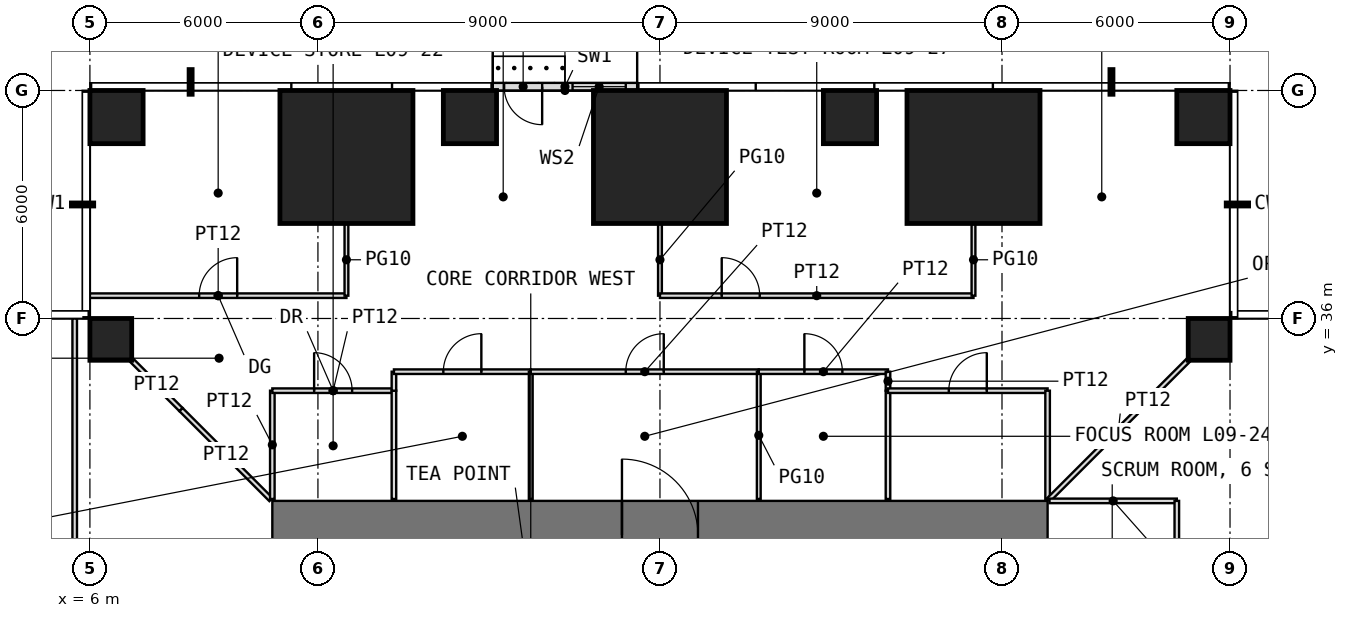
"""IFC4 building model, lengths in metres.
Left out: names, types, materials, properties, quantities, classifications, styles, units other than length and angle.
Written with IfcOpenShell. Run it as: python <this file> out.ifc"""

import sys

from ifc_helpers import new_model, si_unit, direction, frame, frame_2d, origin, origin_2d, place, context, subcontext, project, spatial, rectangle, extrude, element, fill, save


model = new_model("IFC4")
c1 = context("Model", 3, precision=1e-05, world=origin(), true_north=direction((0.0, 1.0)))
c2 = subcontext(c1, "Body", "Model", "MODEL_VIEW")
j1 = project(units=[si_unit("LENGTHUNIT", "METRE"), si_unit("PLANEANGLEUNIT", "RADIAN")], contexts=[c1])
p1 = place(None, origin())
s1 = spatial("IfcSite", under=j1, at=p1, CompositionType="ELEMENT")
p2 = place(p1, origin())
s2 = spatial("IfcBuilding", under=s1, at=p2, CompositionType="ELEMENT")
p3 = place(p2, frame((0.0, 0.0, 42.5)))
s3 = spatial("IfcBuildingStorey", under=s2, at=p3, CompositionType="ELEMENT", Elevation=42.5)
for number, where, z_axis, x_axis in (
    (1, (6.55, 35.45, 0.0), (0.0, 0.0, 1.0), (1.0, 0.0, 0.0)),
    (2, (35.45, 35.45, 0.0), (0.0, 0.0, 1.0), (1.0, 0.0, 0.0)),
):
    element("IfcColumn", number, at=place(p3, frame(where, z_axis=z_axis, x_axis=x_axis)), inside=s3, PredefinedType="COLUMN", context=c2, shape_type="SweptSolid", body=[
        extrude(rectangle(XDim=1.1, YDim=1.1, at=origin_2d()), origin(), (0.0, 0.0, 1.0), 4.0),
    ])
p4 = place(p3, frame((6.7, 41.3, 0.0), z_axis=(0.0, 0.0, 1.0), x_axis=(1.0, 0.0, 0.0)))
e3 = element("IfcColumn", 3, at=p4, inside=s3, PredefinedType="COLUMN", context=c2, shape_type="SweptSolid", body=[
    extrude(rectangle(XDim=1.4, YDim=1.4, at=origin_2d()), origin(), (0.0, 0.0, 1.0), 4.0),
])
p5 = place(p3, frame((12.75, 40.25, 0.0), z_axis=(0.0, 0.0, 1.0), x_axis=(1.0, 0.0, 0.0)))
e4 = element("IfcColumn", 4, at=p5, inside=s3, PredefinedType="COLUMN", context=c2, shape_type="SweptSolid", body=[
    extrude(rectangle(XDim=3.5, YDim=3.5, at=origin_2d()), origin(), (0.0, 0.0, 1.0), 4.0),
])
p6 = place(p3, frame((16.0, 41.3, 0.0), z_axis=(0.0, 0.0, 1.0), x_axis=(1.0, 0.0, 0.0)))
e5 = element("IfcColumn", 5, at=p6, inside=s3, PredefinedType="COLUMN", context=c2, shape_type="SweptSolid", body=[
    extrude(rectangle(XDim=1.4, YDim=1.4, at=origin_2d()), origin(), (0.0, 0.0, 1.0), 4.0),
])
p7 = place(p3, frame((21.0, 40.25, 0.0), z_axis=(0.0, 0.0, 1.0), x_axis=(1.0, 0.0, 0.0)))
e6 = element("IfcColumn", 6, at=p7, inside=s3, PredefinedType="COLUMN", context=c2, shape_type="SweptSolid", body=[
    extrude(rectangle(XDim=3.5, YDim=3.5, at=origin_2d()), origin(), (0.0, 0.0, 1.0), 4.0),
])
p8 = place(p3, frame((26.0, 41.3, 0.0), z_axis=(0.0, 0.0, 1.0), x_axis=(1.0, 0.0, 0.0)))
e7 = element("IfcColumn", 7, at=p8, inside=s3, PredefinedType="COLUMN", context=c2, shape_type="SweptSolid", body=[
    extrude(rectangle(XDim=1.4, YDim=1.4, at=origin_2d()), origin(), (0.0, 0.0, 1.0), 4.0),
])
p9 = place(p3, frame((29.25, 40.25, 0.0), z_axis=(0.0, 0.0, 1.0), x_axis=(1.0, 0.0, 0.0)))
e8 = element("IfcColumn", 8, at=p9, inside=s3, PredefinedType="COLUMN", context=c2, shape_type="SweptSolid", body=[
    extrude(rectangle(XDim=3.5, YDim=3.5, at=origin_2d()), origin(), (0.0, 0.0, 1.0), 4.0),
])
p10 = place(p3, frame((35.3, 41.3, 0.0), z_axis=(0.0, 0.0, 1.0), x_axis=(1.0, 0.0, 0.0)))
e9 = element("IfcColumn", 9, at=p10, inside=s3, PredefinedType="COLUMN", context=c2, shape_type="SweptSolid", body=[
    extrude(rectangle(XDim=1.4, YDim=1.4, at=origin_2d()), origin(), (0.0, 0.0, 1.0), 4.0),
])
p11 = place(p3, frame((20.4, 42.1, 0.0), z_axis=(0.0, 0.0, 1.0), x_axis=(-1.0, 0.0, 0.0)))
e10 = element("IfcWall", 10, at=p11, inside=s3, PredefinedType="USERDEFINED", context=c2, shape_type="SweptSolid", body=[
    extrude(rectangle(XDim=3.8, YDim=0.2, at=frame_2d((1.9, 0.0))), origin(), (0.0, 0.0, 1.0), 3.75),
])
p12 = place(p11, frame((2.5, 0.0, 0.0)))
e11 = element("IfcOpeningElement", 11, at=p12, cuts=e10, PredefinedType="OPENING", context=c2, shape_type="SweptSolid", body=[
    extrude(rectangle(XDim=1.0, YDim=2.4, at=frame_2d((0.5, 1.2))), frame((0.0, 0.11, 0.0), z_axis=(0.0, -1.0, 0.0), x_axis=(1.0, 0.0, 0.0)), (0.0, 0.0, 1.0), 0.22),
])
p13 = place(p11, frame((0.3, 0.0, 0.3)))
e12 = element("IfcOpeningElement", 12, at=p13, cuts=e10, PredefinedType="OPENING", context=c2, shape_type="SweptSolid", body=[
    extrude(rectangle(XDim=1.4, YDim=2.7, at=frame_2d((0.7, 1.35))), frame((0.0, 0.11, 0.0), z_axis=(0.0, -1.0, 0.0), x_axis=(1.0, 0.0, 0.0)), (0.0, 0.0, 1.0), 0.22),
])
p14 = place(p3, frame((10.8, 30.3, -0.05), z_axis=(0.0, 0.0, 1.0), x_axis=(1.0, 0.0, 0.0)))
e13 = element("IfcWall", 13, at=p14, inside=s3, PredefinedType="SHEAR", context=c2, shape_type="SweptSolid", body=[
    extrude(rectangle(XDim=20.4, YDim=1.8, at=frame_2d((10.2, 0.0))), origin(), (0.0, 0.0, 1.0), 4.0),
])
p15 = place(p14, frame((9.2, 0.0, 0.05)))
e14 = element("IfcOpeningElement", 14, at=p15, cuts=e13, PredefinedType="OPENING", context=c2, shape_type="SweptSolid", body=[
    extrude(rectangle(XDim=2.0, YDim=2.2, at=frame_2d((1.0, 1.1))), frame((0.0, 0.91, 0.0), z_axis=(0.0, -1.0, 0.0), x_axis=(1.0, 0.0, 0.0)), (0.0, 0.0, 1.0), 1.82),
])
p16 = place(p3, frame((5.6, 6.0, 0.0), z_axis=(0.0, 0.0, 1.0), x_axis=(0.0, 1.0, 0.0)))
e15 = element("IfcWall", 15, at=p16, inside=s3, PredefinedType="PARTITIONING", context=c2, shape_type="SweptSolid", body=[
    extrude(rectangle(XDim=30.0, YDim=0.12, at=frame_2d((15.0, 0.0))), origin(), (0.0, 0.0, 1.0), 3.75),
])
p17 = place(p16, frame((14.5, 0.0, 0.0)))
e16 = element("IfcOpeningElement", 16, at=p17, cuts=e15, PredefinedType="OPENING", context=c2, shape_type="SweptSolid", body=[
    extrude(rectangle(XDim=1.0, YDim=2.4, at=frame_2d((0.5, 1.2))), frame((0.0, 0.07, 0.0), z_axis=(0.0, -1.0, 0.0), x_axis=(1.0, 0.0, 0.0)), (0.0, 0.0, 1.0), 0.14),
])
p18 = place(p3, frame((6.0, 36.6, 0.0), z_axis=(0.0, 0.0, 1.0), x_axis=(1.0, 0.0, 0.0)))
e17 = element("IfcWall", 17, at=p18, inside=s3, PredefinedType="PARTITIONING", context=c2, shape_type="SweptSolid", body=[
    extrude(rectangle(XDim=6.75, YDim=0.12, at=frame_2d((3.375, 0.0))), origin(), (0.0, 0.0, 1.0), 3.75),
])
p19 = place(p18, frame((2.875, 0.0, 0.0)))
e18 = element("IfcOpeningElement", 18, at=p19, cuts=e17, PredefinedType="OPENING", context=c2, shape_type="SweptSolid", body=[
    extrude(rectangle(XDim=1.0, YDim=2.4, at=frame_2d((0.5, 1.2))), frame((0.0, 0.07, 0.0), z_axis=(0.0, -1.0, 0.0), x_axis=(1.0, 0.0, 0.0)), (0.0, 0.0, 1.0), 0.14),
])
p20 = place(p3, frame((7.11, 34.89, 0.0), z_axis=(0.0, 0.0, 1.0), x_axis=(0.707106781187, -0.707106781187, 0.0)))
e19 = element("IfcWall", 19, at=p20, inside=s3, PredefinedType="PARTITIONING", context=c2, shape_type="SweptSolid", body=[
    extrude(rectangle(XDim=1.822, YDim=0.12, at=frame_2d((0.911, 0.0))), origin(), (0.0, 0.0, 1.0), 3.75),
])
p21 = place(p3, frame((8.398, 33.602, 0.0), z_axis=(0.0, 0.0, 1.0), x_axis=(0.707106781187, -0.707106781187, 0.0)))
e20 = element("IfcWall", 20, at=p21, inside=s3, PredefinedType="PARTITIONING", context=c2, shape_type="SweptSolid", body=[
    extrude(rectangle(XDim=3.346, YDim=0.12, at=frame_2d((1.673, 0.0))), origin(), (0.0, 0.0, 1.0), 3.75),
])
p22 = place(p3, frame((10.8, 31.25, 0.0), z_axis=(0.0, 0.0, 1.0), x_axis=(0.0, 1.0, 0.0)))
e21 = element("IfcWall", 21, at=p22, inside=s3, PredefinedType="PARTITIONING", context=c2, shape_type="SweptSolid", body=[
    extrude(rectangle(XDim=2.85, YDim=0.12, at=frame_2d((1.425, 0.0))), origin(), (0.0, 0.0, 1.0), 3.75),
])
p23 = place(p3, frame((10.8, 34.1, 0.0), z_axis=(0.0, 0.0, 1.0), x_axis=(1.0, 0.0, 0.0)))
e22 = element("IfcWall", 22, at=p23, inside=s3, PredefinedType="PARTITIONING", context=c2, shape_type="SweptSolid", body=[
    extrude(rectangle(XDim=3.2, YDim=0.12, at=frame_2d((1.6, 0.0))), origin(), (0.0, 0.0, 1.0), 3.75),
])
p24 = place(p23, frame((1.1, 0.0, 0.0)))
e23 = element("IfcOpeningElement", 23, at=p24, cuts=e22, PredefinedType="OPENING", context=c2, shape_type="SweptSolid", body=[
    extrude(rectangle(XDim=1.0, YDim=2.2, at=frame_2d((0.5, 1.1))), frame((0.0, 0.07, 0.0), z_axis=(0.0, -1.0, 0.0), x_axis=(1.0, 0.0, 0.0)), (0.0, 0.0, 1.0), 0.14),
])
p25 = place(p3, frame((12.75, 36.6, 0.0), z_axis=(0.0, 0.0, 1.0), x_axis=(0.0, 1.0, 0.0)))
e24 = element("IfcWall", 24, at=p25, inside=s3, PredefinedType="PARTITIONING", context=c2, shape_type="SweptSolid", body=[
    extrude(rectangle(XDim=1.89, YDim=0.1, at=frame_2d((0.945, 0.0))), origin(), (0.0, 0.0, 1.0), 3.75),
])
p26 = place(p3, frame((14.0, 31.25, 0.0), z_axis=(0.0, 0.0, 1.0), x_axis=(0.0, 1.0, 0.0)))
e25 = element("IfcWall", 25, at=p26, inside=s3, PredefinedType="PARTITIONING", context=c2, shape_type="SweptSolid", body=[
    extrude(rectangle(XDim=2.85, YDim=0.12, at=frame_2d((1.425, 0.0))), origin(), (0.0, 0.0, 1.0), 3.75),
])
p27 = place(p3, frame((14.0, 34.1, 0.0), z_axis=(0.0, 0.0, 1.0), x_axis=(0.0, 1.0, 0.0)))
e26 = element("IfcWall", 26, at=p27, inside=s3, PredefinedType="PARTITIONING", context=c2, shape_type="SweptSolid", body=[
    extrude(rectangle(XDim=0.5, YDim=0.12, at=frame_2d((0.25, 0.0))), origin(), (0.0, 0.0, 1.0), 3.75),
])
p28 = place(p3, frame((14.0, 34.6, 0.0), z_axis=(0.0, 0.0, 1.0), x_axis=(1.0, 0.0, 0.0)))
e27 = element("IfcWall", 27, at=p28, inside=s3, PredefinedType="PARTITIONING", context=c2, shape_type="SweptSolid", body=[
    extrude(rectangle(XDim=3.6, YDim=0.12, at=frame_2d((1.8, 0.0))), origin(), (0.0, 0.0, 1.0), 3.75),
])
p29 = place(p28, frame((1.3, 0.0, 0.0)))
e28 = element("IfcOpeningElement", 28, at=p29, cuts=e27, PredefinedType="OPENING", context=c2, shape_type="SweptSolid", body=[
    extrude(rectangle(XDim=1.0, YDim=2.4, at=frame_2d((0.5, 1.2))), frame((0.0, 0.07, 0.0), z_axis=(0.0, -1.0, 0.0), x_axis=(1.0, 0.0, 0.0)), (0.0, 0.0, 1.0), 0.14),
])
p30 = place(p3, frame((17.6, 31.25, 0.0), z_axis=(0.0, 0.0, 1.0), x_axis=(0.0, 1.0, 0.0)))
e29 = element("IfcWall", 29, at=p30, inside=s3, PredefinedType="PARTITIONING", context=c2, shape_type="SweptSolid", body=[
    extrude(rectangle(XDim=3.35, YDim=0.1, at=frame_2d((1.675, 0.0))), origin(), (0.0, 0.0, 1.0), 3.75),
])
p31 = place(p3, frame((17.6, 34.6, 0.0), z_axis=(0.0, 0.0, 1.0), x_axis=(1.0, 0.0, 0.0)))
e30 = element("IfcWall", 30, at=p31, inside=s3, PredefinedType="PARTITIONING", context=c2, shape_type="SweptSolid", body=[
    extrude(rectangle(XDim=6.0, YDim=0.12, at=frame_2d((3.0, 0.0))), origin(), (0.0, 0.0, 1.0), 3.75),
])
p32 = place(p31, frame((2.5, 0.0, 0.0)))
e31 = element("IfcOpeningElement", 31, at=p32, cuts=e30, PredefinedType="OPENING", context=c2, shape_type="SweptSolid", body=[
    extrude(rectangle(XDim=1.0, YDim=2.4, at=frame_2d((0.5, 1.2))), frame((0.0, 0.07, 0.0), z_axis=(0.0, -1.0, 0.0), x_axis=(1.0, 0.0, 0.0)), (0.0, 0.0, 1.0), 0.14),
])
p33 = place(p3, frame((21.0, 36.6, 0.0), z_axis=(0.0, 0.0, 1.0), x_axis=(0.0, 1.0, 0.0)))
e32 = element("IfcWall", 32, at=p33, inside=s3, PredefinedType="PARTITIONING", context=c2, shape_type="SweptSolid", body=[
    extrude(rectangle(XDim=1.89, YDim=0.1, at=frame_2d((0.945, 0.0))), origin(), (0.0, 0.0, 1.0), 3.75),
])
p34 = place(p3, frame((21.0, 36.6, 0.0), z_axis=(0.0, 0.0, 1.0), x_axis=(1.0, 0.0, 0.0)))
e33 = element("IfcWall", 33, at=p34, inside=s3, PredefinedType="PARTITIONING", context=c2, shape_type="SweptSolid", body=[
    extrude(rectangle(XDim=8.25, YDim=0.12, at=frame_2d((4.125, 0.0))), origin(), (0.0, 0.0, 1.0), 3.75),
])
p35 = place(p34, frame((1.625, 0.0, 0.0)))
e34 = element("IfcOpeningElement", 34, at=p35, cuts=e33, PredefinedType="OPENING", context=c2, shape_type="SweptSolid", body=[
    extrude(rectangle(XDim=1.0, YDim=2.4, at=frame_2d((0.5, 1.2))), frame((0.0, 0.07, 0.0), z_axis=(0.0, -1.0, 0.0), x_axis=(1.0, 0.0, 0.0)), (0.0, 0.0, 1.0), 0.14),
])
p36 = place(p3, frame((23.6, 31.25, 0.0), z_axis=(0.0, 0.0, 1.0), x_axis=(0.0, 1.0, 0.0)))
e35 = element("IfcWall", 35, at=p36, inside=s3, PredefinedType="PARTITIONING", context=c2, shape_type="SweptSolid", body=[
    extrude(rectangle(XDim=3.35, YDim=0.1, at=frame_2d((1.675, 0.0))), origin(), (0.0, 0.0, 1.0), 3.75),
])
p37 = place(p3, frame((23.6, 34.6, 0.0), z_axis=(0.0, 0.0, 1.0), x_axis=(1.0, 0.0, 0.0)))
e36 = element("IfcWall", 36, at=p37, inside=s3, PredefinedType="PARTITIONING", context=c2, shape_type="SweptSolid", body=[
    extrude(rectangle(XDim=3.4, YDim=0.12, at=frame_2d((1.7, 0.0))), origin(), (0.0, 0.0, 1.0), 3.75),
])
p38 = place(p37, frame((1.2, 0.0, 0.0)))
e37 = element("IfcOpeningElement", 37, at=p38, cuts=e36, PredefinedType="OPENING", context=c2, shape_type="SweptSolid", body=[
    extrude(rectangle(XDim=1.0, YDim=2.4, at=frame_2d((0.5, 1.2))), frame((0.0, 0.07, 0.0), z_axis=(0.0, -1.0, 0.0), x_axis=(1.0, 0.0, 0.0)), (0.0, 0.0, 1.0), 0.14),
])
p39 = place(p3, frame((27.0, 31.25, 0.0), z_axis=(0.0, 0.0, 1.0), x_axis=(0.0, 1.0, 0.0)))
e38 = element("IfcWall", 38, at=p39, inside=s3, PredefinedType="PARTITIONING", context=c2, shape_type="SweptSolid", body=[
    extrude(rectangle(XDim=2.85, YDim=0.12, at=frame_2d((1.425, 0.0))), origin(), (0.0, 0.0, 1.0), 3.75),
])
p40 = place(p3, frame((27.0, 34.1, 0.0), z_axis=(0.0, 0.0, 1.0), x_axis=(0.0, 1.0, 0.0)))
e39 = element("IfcWall", 39, at=p40, inside=s3, PredefinedType="PARTITIONING", context=c2, shape_type="SweptSolid", body=[
    extrude(rectangle(XDim=0.5, YDim=0.12, at=frame_2d((0.25, 0.0))), origin(), (0.0, 0.0, 1.0), 3.75),
])
p41 = place(p3, frame((27.0, 34.1, 0.0), z_axis=(0.0, 0.0, 1.0), x_axis=(1.0, 0.0, 0.0)))
e40 = element("IfcWall", 40, at=p41, inside=s3, PredefinedType="PARTITIONING", context=c2, shape_type="SweptSolid", body=[
    extrude(rectangle(XDim=4.2, YDim=0.12, at=frame_2d((2.1, 0.0))), origin(), (0.0, 0.0, 1.0), 3.75),
])
p42 = place(p41, frame((1.6, 0.0, 0.0)))
e41 = element("IfcOpeningElement", 41, at=p42, cuts=e40, PredefinedType="OPENING", context=c2, shape_type="SweptSolid", body=[
    extrude(rectangle(XDim=1.0, YDim=2.2, at=frame_2d((0.5, 1.1))), frame((0.0, 0.07, 0.0), z_axis=(0.0, -1.0, 0.0), x_axis=(1.0, 0.0, 0.0)), (0.0, 0.0, 1.0), 0.14),
])
p43 = place(p3, frame((29.25, 36.6, 0.0), z_axis=(0.0, 0.0, 1.0), x_axis=(0.0, 1.0, 0.0)))
e42 = element("IfcWall", 42, at=p43, inside=s3, PredefinedType="PARTITIONING", context=c2, shape_type="SweptSolid", body=[
    extrude(rectangle(XDim=1.89, YDim=0.1, at=frame_2d((0.945, 0.0))), origin(), (0.0, 0.0, 1.0), 3.75),
])
p44 = place(p3, frame((31.2, 31.25, 0.0), z_axis=(0.0, 0.0, 1.0), x_axis=(0.0, 1.0, 0.0)))
e43 = element("IfcWall", 43, at=p44, inside=s3, PredefinedType="PARTITIONING", context=c2, shape_type="SweptSolid", body=[
    extrude(rectangle(XDim=2.85, YDim=0.12, at=frame_2d((1.425, 0.0))), origin(), (0.0, 0.0, 1.0), 3.75),
])
p45 = place(p3, frame((31.235, 31.235, 0.0), z_axis=(0.0, 0.0, 1.0), x_axis=(0.707106781187, 0.707106781187, 0.0)))
e44 = element("IfcWall", 44, at=p45, inside=s3, PredefinedType="PARTITIONING", context=c2, shape_type="SweptSolid", body=[
    extrude(rectangle(XDim=5.168, YDim=0.12, at=frame_2d((2.584, 0.0))), origin(), (0.0, 0.0, 1.0), 3.75),
])
p46 = place(p3, frame((31.25, 31.2, 0.0), z_axis=(0.0, 0.0, 1.0), x_axis=(1.0, 0.0, 0.0)))
e45 = element("IfcWall", 45, at=p46, inside=s3, PredefinedType="PARTITIONING", context=c2, shape_type="SweptSolid", body=[
    extrude(rectangle(XDim=3.35, YDim=0.12, at=frame_2d((1.675, 0.0))), origin(), (0.0, 0.0, 1.0), 3.75),
])
p47 = place(p3, frame((34.6, 25.4, 0.0), z_axis=(0.0, 0.0, 1.0), x_axis=(0.0, 1.0, 0.0)))
e46 = element("IfcWall", 46, at=p47, inside=s3, PredefinedType="PARTITIONING", context=c2, shape_type="SweptSolid", body=[
    extrude(rectangle(XDim=5.8, YDim=0.12, at=frame_2d((2.9, 0.0))), origin(), (0.0, 0.0, 1.0), 3.75),
])
p48 = place(p47, frame((2.4, 0.0, 0.0)))
e47 = element("IfcOpeningElement", 47, at=p48, cuts=e46, PredefinedType="OPENING", context=c2, shape_type="SweptSolid", body=[
    extrude(rectangle(XDim=1.0, YDim=2.4, at=frame_2d((0.5, 1.2))), frame((0.0, 0.07, 0.0), z_axis=(0.0, -1.0, 0.0), x_axis=(1.0, 0.0, 0.0)), (0.0, 0.0, 1.0), 0.14),
])
p49 = place(p12, origin())
e48 = element("IfcDoor", 48, at=p49, inside=s3, OperationType="SINGLE_SWING_LEFT", PredefinedType="DOOR", context=c2, shape_type="SweptSolid", body=[
    extrude(rectangle(XDim=1.0, YDim=2.4, at=frame_2d((0.5, 1.2))), frame((0.0, 0.025, 0.0), z_axis=(0.0, -1.0, 0.0), x_axis=(1.0, 0.0, 0.0)), (0.0, 0.0, 1.0), 0.05),
])
fill(e11, e48)
p50 = place(p13, origin())
e49 = element("IfcWindow", 49, at=p50, inside=s3, PartitioningType="SINGLE_PANEL", PredefinedType="WINDOW", context=c2, shape_type="SweptSolid", body=[
    extrude(rectangle(XDim=1.4, YDim=2.7, at=frame_2d((0.7, 1.35))), frame((0.0, 0.03, 0.0), z_axis=(0.0, -1.0, 0.0), x_axis=(1.0, 0.0, 0.0)), (0.0, 0.0, 1.0), 0.06),
])
fill(e12, e49)
p51 = place(p15, origin())
e50 = element("IfcDoor", 50, at=p51, inside=s3, OperationType="DOUBLE_DOOR_SINGLE_SWING", PredefinedType="DOOR", context=c2, shape_type="SweptSolid", body=[
    extrude(rectangle(XDim=2.0, YDim=2.2, at=frame_2d((1.0, 1.1))), frame((0.0, 0.025, 0.0), z_axis=(0.0, -1.0, 0.0), x_axis=(1.0, 0.0, 0.0)), (0.0, 0.0, 1.0), 0.05),
])
fill(e14, e50)
p52 = place(p24, origin())
e51 = element("IfcDoor", 51, at=p52, inside=s3, OperationType="SINGLE_SWING_LEFT", PredefinedType="DOOR", context=c2, shape_type="SweptSolid", body=[
    extrude(rectangle(XDim=1.0, YDim=2.2, at=frame_2d((0.5, 1.1))), frame((0.0, 0.025, 0.0), z_axis=(0.0, -1.0, 0.0), x_axis=(1.0, 0.0, 0.0)), (0.0, 0.0, 1.0), 0.05),
])
fill(e23, e51)
p53 = place(p29, origin())
e52 = element("IfcDoor", 52, at=p53, inside=s3, OperationType="SINGLE_SWING_RIGHT", PredefinedType="DOOR", context=c2, shape_type="SweptSolid", body=[
    extrude(rectangle(XDim=1.0, YDim=2.4, at=frame_2d((0.5, 1.2))), frame((0.0, 0.025, 0.0), z_axis=(0.0, -1.0, 0.0), x_axis=(1.0, 0.0, 0.0)), (0.0, 0.0, 1.0), 0.05),
])
fill(e28, e52)
p54 = place(p38, origin())
e53 = element("IfcDoor", 53, at=p54, inside=s3, OperationType="SINGLE_SWING_LEFT", PredefinedType="DOOR", context=c2, shape_type="SweptSolid", body=[
    extrude(rectangle(XDim=1.0, YDim=2.4, at=frame_2d((0.5, 1.2))), frame((0.0, 0.025, 0.0), z_axis=(0.0, -1.0, 0.0), x_axis=(1.0, 0.0, 0.0)), (0.0, 0.0, 1.0), 0.05),
])
fill(e37, e53)
p55 = place(p42, origin())
e54 = element("IfcDoor", 54, at=p55, inside=s3, OperationType="SINGLE_SWING_RIGHT", PredefinedType="DOOR", context=c2, shape_type="SweptSolid", body=[
    extrude(rectangle(XDim=1.0, YDim=2.2, at=frame_2d((0.5, 1.1))), frame((0.0, 0.025, 0.0), z_axis=(0.0, -1.0, 0.0), x_axis=(1.0, 0.0, 0.0)), (0.0, 0.0, 1.0), 0.05),
])
fill(e41, e54)
p56 = place(p19, origin())
e55 = element("IfcDoor", 55, at=p56, inside=s3, OperationType="SINGLE_SWING_RIGHT", PredefinedType="DOOR", context=c2, shape_type="SweptSolid", body=[
    extrude(rectangle(XDim=1.0, YDim=2.4, at=frame_2d((0.5, 1.2))), frame((0.0, 0.025, 0.0), z_axis=(0.0, -1.0, 0.0), x_axis=(1.0, 0.0, 0.0)), (0.0, 0.0, 1.0), 0.05),
])
fill(e18, e55)
p57 = place(p35, origin())
e56 = element("IfcDoor", 56, at=p57, inside=s3, OperationType="SINGLE_SWING_LEFT", PredefinedType="DOOR", context=c2, shape_type="SweptSolid", body=[
    extrude(rectangle(XDim=1.0, YDim=2.4, at=frame_2d((0.5, 1.2))), frame((0.0, 0.025, 0.0), z_axis=(0.0, -1.0, 0.0), x_axis=(1.0, 0.0, 0.0)), (0.0, 0.0, 1.0), 0.05),
])
fill(e34, e56)
p58 = place(p32, origin())
e57 = element("IfcDoor", 57, at=p58, inside=s3, OperationType="SINGLE_SWING_RIGHT", PredefinedType="DOOR", context=c2, shape_type="SweptSolid", body=[
    extrude(rectangle(XDim=1.0, YDim=2.4, at=frame_2d((0.5, 1.2))), frame((0.0, 0.025, 0.0), z_axis=(0.0, -1.0, 0.0), x_axis=(1.0, 0.0, 0.0)), (0.0, 0.0, 1.0), 0.05),
])
fill(e31, e57)
save(model, sys.argv[1])
